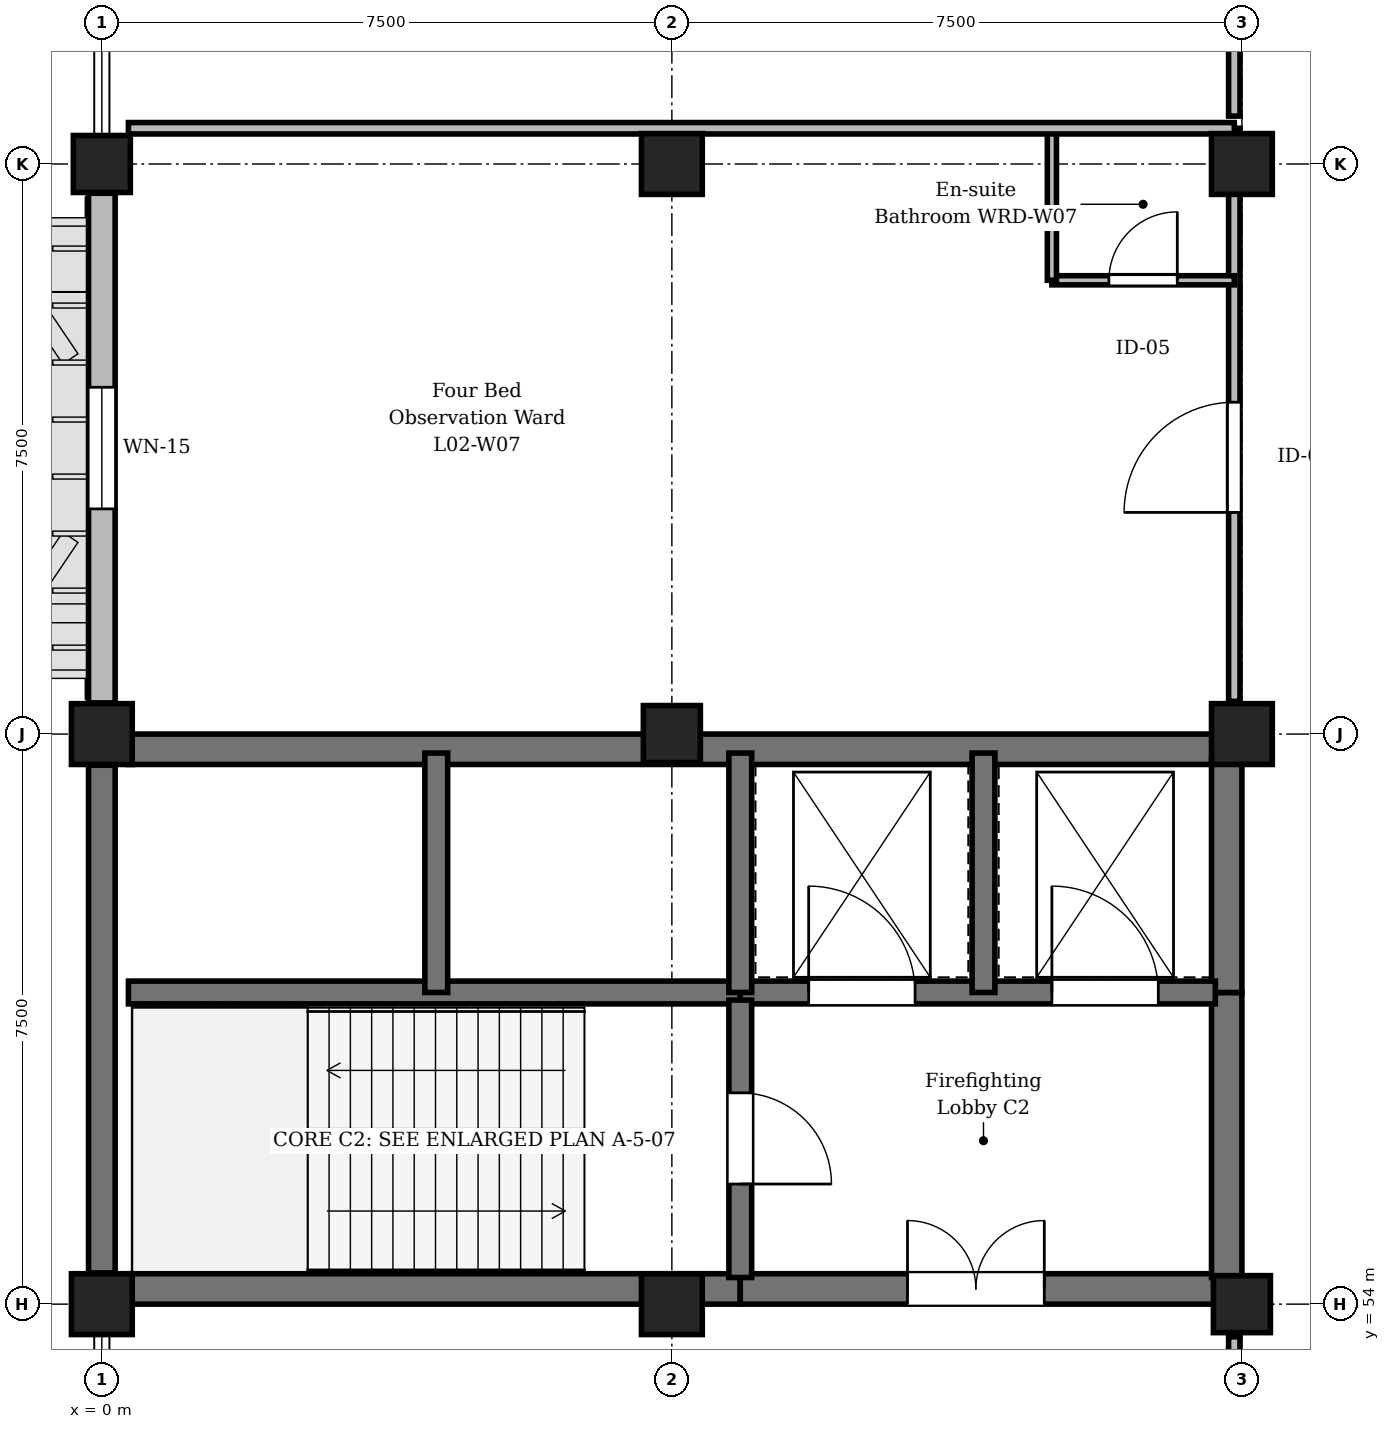
"""IFC4 building model, lengths in metres.
Left out: names, types, materials, properties, quantities, classifications, styles, units other than length and angle.
Written with IfcOpenShell. Run it as: python <this file> out.ifc"""

import sys

from ifc_helpers import new_model, si_unit, direction, frame, frame_2d, origin, origin_2d, place, context, subcontext, project, spatial, rectangle, circle, extrude, element, fill, save


model = new_model("IFC4")
c1 = context("Model", 3, precision=1e-05, world=origin(), true_north=direction((0.0, 1.0)))
c2 = subcontext(c1, "Body", "Model", "MODEL_VIEW")
j1 = project(units=[si_unit("LENGTHUNIT", "METRE"), si_unit("PLANEANGLEUNIT", "RADIAN")], contexts=[c1])
p1 = place(None, origin())
s1 = spatial("IfcSite", under=j1, at=p1, CompositionType="ELEMENT")
p2 = place(p1, origin())
s2 = spatial("IfcBuilding", under=s1, at=p2, CompositionType="ELEMENT")
p3 = place(p2, frame((0.0, 0.0, 9.3)))
s3 = spatial("IfcBuildingStorey", under=s2, at=p3, CompositionType="ELEMENT", Elevation=9.3)
for number, where, z_axis, x_axis in (
    (1, (0.0, 54.0, 0.0), (0.0, 0.0, 1.0), (1.0, 0.0, 0.0)),
    (2, (0.0, 61.5, 0.0), (0.0, 0.0, 1.0), (1.0, 0.0, 0.0)),
):
    element("IfcColumn", number, at=place(p3, frame(where, z_axis=z_axis, x_axis=x_axis)), inside=s3, PredefinedType="COLUMN", context=c2, shape_type="SweptSolid", body=[
        extrude(rectangle(XDim=0.8, YDim=0.8, at=origin_2d()), origin(), (0.0, 0.0, 1.0), 4.8),
    ])
p4 = place(p3, frame((0.0, 69.0, 0.0), z_axis=(0.0, 0.0, 1.0), x_axis=(1.0, 0.0, 0.0)))
e3 = element("IfcColumn", 3, at=p4, inside=s3, PredefinedType="COLUMN", context=c2, shape_type="SweptSolid", body=[
    extrude(circle(Radius=0.375, at=origin_2d()), origin(), (0.0, 0.0, 1.0), 4.8),
])
p5 = place(p3, frame((7.5, 54.0, 0.0), z_axis=(0.0, 0.0, 1.0), x_axis=(1.0, 0.0, 0.0)))
e4 = element("IfcColumn", 4, at=p5, inside=s3, PredefinedType="COLUMN", context=c2, shape_type="SweptSolid", body=[
    extrude(rectangle(XDim=0.8, YDim=0.8, at=origin_2d()), origin(), (0.0, 0.0, 1.0), 4.8),
])
p6 = place(p3, frame((7.5, 61.5, 0.0), z_axis=(0.0, 0.0, 1.0), x_axis=(1.0, 0.0, 0.0)))
e5 = element("IfcColumn", 5, at=p6, inside=s3, PredefinedType="COLUMN", context=c2, shape_type="SweptSolid", body=[
    extrude(circle(Radius=0.375, at=origin_2d()), origin(), (0.0, 0.0, 1.0), 4.8),
])
p7 = place(p3, frame((7.5, 69.0, 0.0), z_axis=(0.0, 0.0, 1.0), x_axis=(1.0, 0.0, 0.0)))
e6 = element("IfcColumn", 6, at=p7, inside=s3, PredefinedType="COLUMN", context=c2, shape_type="SweptSolid", body=[
    extrude(rectangle(XDim=0.8, YDim=0.8, at=origin_2d()), origin(), (0.0, 0.0, 1.0), 4.8),
])
p8 = place(p3, frame((15.0, 54.0, 0.0), z_axis=(0.0, 0.0, 1.0), x_axis=(1.0, 0.0, 0.0)))
e7 = element("IfcColumn", 7, at=p8, inside=s3, PredefinedType="COLUMN", context=c2, shape_type="SweptSolid", body=[
    extrude(circle(Radius=0.375, at=origin_2d()), origin(), (0.0, 0.0, 1.0), 4.8),
])
for number, where, z_axis, x_axis in (
    (8, (15.0, 61.5, 0.0), (0.0, 0.0, 1.0), (1.0, 0.0, 0.0)),
    (9, (15.0, 69.0, 0.0), (0.0, 0.0, 1.0), (1.0, 0.0, 0.0)),
):
    element("IfcColumn", number, at=place(p3, frame(where, z_axis=z_axis, x_axis=x_axis)), inside=s3, PredefinedType="COLUMN", context=c2, shape_type="SweptSolid", body=[
        extrude(rectangle(XDim=0.8, YDim=0.8, at=origin_2d()), origin(), (0.0, 0.0, 1.0), 4.8),
    ])
p9 = place(p3, frame((0.0, 54.41, 0.0), z_axis=(0.0, 0.0, 1.0), x_axis=(0.0, 1.0, 0.0)))
e10 = element("IfcWall", 10, at=p9, inside=s3, PredefinedType="SHEAR", context=c2, shape_type="SweptSolid", body=[
    extrude(rectangle(XDim=6.68, YDim=0.35, at=frame_2d((3.34, 0.0))), origin(), (0.0, 0.0, 1.0), 4.55),
])
p10 = place(p3, frame((0.0, 61.91, 0.0), z_axis=(0.0, 0.0, 1.0), x_axis=(0.0, 1.0, 0.0)))
e11 = element("IfcWall", 11, at=p10, inside=s3, PredefinedType="STANDARD", context=c2, shape_type="SweptSolid", body=[
    extrude(rectangle(XDim=6.705, YDim=0.35, at=frame_2d((3.353, 0.0))), origin(), (0.0, 0.0, 1.0), 3.95),
])
p11 = place(p10, frame((2.552, 0.0, 0.9)))
e12 = element("IfcOpeningElement", 12, at=p11, cuts=e11, PredefinedType="OPENING", context=c2, shape_type="SweptSolid", body=[
    extrude(rectangle(XDim=1.6, YDim=1.8, at=frame_2d((0.8, 0.9))), frame((0.0, 0.185, 0.0), z_axis=(0.0, -1.0, 0.0), x_axis=(1.0, 0.0, 0.0)), (0.0, 0.0, 1.0), 0.37),
])
p12 = place(p3, frame((0.35, 54.2, 0.0), z_axis=(0.0, 0.0, 1.0), x_axis=(1.0, 0.0, 0.0)))
e13 = element("IfcWall", 13, at=p12, inside=s3, PredefinedType="SHEAR", context=c2, shape_type="SweptSolid", body=[
    extrude(rectangle(XDim=8.05, YDim=0.4, at=frame_2d((4.025, 0.0))), origin(), (0.0, 0.0, 1.0), 4.55),
])
p13 = place(p3, frame((8.4, 54.2, 0.0), z_axis=(0.0, 0.0, 1.0), x_axis=(1.0, 0.0, 0.0)))
e14 = element("IfcWall", 14, at=p13, inside=s3, PredefinedType="SHEAR", context=c2, shape_type="SweptSolid", body=[
    extrude(rectangle(XDim=6.25, YDim=0.4, at=frame_2d((3.125, 0.0))), origin(), (0.0, 0.0, 1.0), 4.55),
])
p14 = place(p13, frame((2.2, 0.0, 0.0)))
e15 = element("IfcOpeningElement", 15, at=p14, cuts=e14, PredefinedType="OPENING", context=c2, shape_type="SweptSolid", body=[
    extrude(rectangle(XDim=1.8, YDim=2.25, at=frame_2d((0.9, 1.125))), frame((0.0, 0.21, 0.0), z_axis=(0.0, -1.0, 0.0), x_axis=(1.0, 0.0, 0.0)), (0.0, 0.0, 1.0), 0.42),
])
p15 = place(p3, frame((0.35, 61.3, 0.0), z_axis=(0.0, 0.0, 1.0), x_axis=(1.0, 0.0, 0.0)))
e16 = element("IfcWall", 16, at=p15, inside=s3, PredefinedType="SHEAR", context=c2, shape_type="SweptSolid", body=[
    extrude(rectangle(XDim=14.3, YDim=0.4, at=frame_2d((7.15, 0.0))), origin(), (0.0, 0.0, 1.0), 4.55),
])
p16 = place(p3, frame((14.8, 54.35, 0.0), z_axis=(0.0, 0.0, 1.0), x_axis=(0.0, 1.0, 0.0)))
e17 = element("IfcWall", 17, at=p16, inside=s3, PredefinedType="SHEAR", context=c2, shape_type="SweptSolid", body=[
    extrude(rectangle(XDim=3.75, YDim=0.4, at=frame_2d((1.875, 0.0))), origin(), (0.0, 0.0, 1.0), 4.55),
])
p17 = place(p3, frame((14.8, 58.1, 0.0), z_axis=(0.0, 0.0, 1.0), x_axis=(0.0, 1.0, 0.0)))
e18 = element("IfcWall", 18, at=p17, inside=s3, PredefinedType="SHEAR", context=c2, shape_type="SweptSolid", body=[
    extrude(rectangle(XDim=3.05, YDim=0.4, at=frame_2d((1.525, 0.0))), origin(), (0.0, 0.0, 1.0), 4.55),
])
p18 = place(p3, frame((0.35, 58.1, 0.0), z_axis=(0.0, 0.0, 1.0), x_axis=(1.0, 0.0, 0.0)))
e19 = element("IfcWall", 19, at=p18, inside=s3, PredefinedType="SHEAR", context=c2, shape_type="SweptSolid", body=[
    extrude(rectangle(XDim=8.05, YDim=0.3, at=frame_2d((4.025, 0.0))), origin(), (0.0, 0.0, 1.0), 4.55),
])
p19 = place(p3, frame((8.4, 58.1, 0.0), z_axis=(0.0, 0.0, 1.0), x_axis=(1.0, 0.0, 0.0)))
e20 = element("IfcWall", 20, at=p19, inside=s3, PredefinedType="SHEAR", context=c2, shape_type="SweptSolid", body=[
    extrude(rectangle(XDim=6.25, YDim=0.3, at=frame_2d((3.125, 0.0))), origin(), (0.0, 0.0, 1.0), 4.55),
])
p20 = place(p19, frame((0.9, 0.0, 0.0)))
e21 = element("IfcOpeningElement", 21, at=p20, cuts=e20, PredefinedType="OPENING", context=c2, shape_type="SweptSolid", body=[
    extrude(rectangle(XDim=1.4, YDim=2.25, at=frame_2d((0.7, 1.125))), frame((0.0, 0.16, 0.0), z_axis=(0.0, -1.0, 0.0), x_axis=(1.0, 0.0, 0.0)), (0.0, 0.0, 1.0), 0.32),
])
p21 = place(p19, frame((4.1, 0.0, 0.0)))
e22 = element("IfcOpeningElement", 22, at=p21, cuts=e20, PredefinedType="OPENING", context=c2, shape_type="SweptSolid", body=[
    extrude(rectangle(XDim=1.4, YDim=2.25, at=frame_2d((0.7, 1.125))), frame((0.0, 0.16, 0.0), z_axis=(0.0, -1.0, 0.0), x_axis=(1.0, 0.0, 0.0)), (0.0, 0.0, 1.0), 0.32),
])
p22 = place(p3, frame((8.4, 58.0, 0.0), z_axis=(0.0, 0.0, 1.0), x_axis=(0.0, -1.0, 0.0)))
e23 = element("IfcWall", 23, at=p22, inside=s3, PredefinedType="SHEAR", context=c2, shape_type="SweptSolid", body=[
    extrude(rectangle(XDim=3.65, YDim=0.3, at=frame_2d((1.825, 0.0))), origin(), (0.0, 0.0, 1.0), 4.55),
])
p23 = place(p22, frame((1.22, 0.0, 0.0)))
e24 = element("IfcOpeningElement", 24, at=p23, cuts=e23, PredefinedType="OPENING", context=c2, shape_type="SweptSolid", body=[
    extrude(rectangle(XDim=1.2, YDim=2.25, at=frame_2d((0.6, 1.125))), frame((0.0, 0.16, 0.0), z_axis=(0.0, -1.0, 0.0), x_axis=(1.0, 0.0, 0.0)), (0.0, 0.0, 1.0), 0.32),
])
for number, where, z_axis, x_axis in (
    (25, (4.4, 58.1, 0.0), (0.0, 0.0, 1.0), (0.0, 1.0, 0.0)),
    (26, (8.4, 58.1, 0.0), (0.0, 0.0, 1.0), (0.0, 1.0, 0.0)),
    (27, (11.6, 58.1, 0.0), (0.0, 0.0, 1.0), (0.0, 1.0, 0.0)),
):
    element("IfcWall", number, at=place(p3, frame(where, z_axis=z_axis, x_axis=x_axis)), inside=s3, PredefinedType="SHEAR", context=c2, shape_type="SweptSolid", body=[
        extrude(rectangle(XDim=3.15, YDim=0.3, at=frame_2d((1.575, 0.0))), origin(), (0.0, 0.0, 1.0), 4.55),
    ])
p24 = place(p3, frame((14.9, 46.07, 0.0), z_axis=(0.0, 0.0, 1.0), x_axis=(0.0, 1.0, 0.0)))
e28 = element("IfcWall", 28, at=p24, inside=s3, PredefinedType="PARTITIONING", context=c2, shape_type="SweptSolid", body=[
    extrude(rectangle(XDim=7.5, YDim=0.15, at=frame_2d((3.75, 0.0))), origin(), (0.0, 0.0, 1.0), 3.985),
])
p25 = place(p24, frame((3.58, 0.0, 0.0)))
e29 = element("IfcOpeningElement", 29, at=p25, cuts=e28, PredefinedType="OPENING", context=c2, shape_type="SweptSolid", body=[
    extrude(rectangle(XDim=1.45, YDim=2.3, at=frame_2d((0.725, 1.15))), frame((0.0, 0.085, 0.0), z_axis=(0.0, -1.0, 0.0), x_axis=(1.0, 0.0, 0.0)), (0.0, 0.0, 1.0), 0.17),
])
p26 = place(p3, frame((14.9, 61.93, 0.0), z_axis=(0.0, 0.0, 1.0), x_axis=(0.0, 1.0, 0.0)))
e30 = element("IfcWall", 30, at=p26, inside=s3, PredefinedType="PARTITIONING", context=c2, shape_type="SweptSolid", body=[
    extrude(rectangle(XDim=7.54, YDim=0.15, at=frame_2d((3.77, 0.0))), origin(), (0.0, 0.0, 1.0), 3.985),
])
p27 = place(p26, frame((2.486, 0.0, 0.0)))
e31 = element("IfcOpeningElement", 31, at=p27, cuts=e30, PredefinedType="OPENING", context=c2, shape_type="SweptSolid", body=[
    extrude(rectangle(XDim=1.45, YDim=2.3, at=frame_2d((0.725, 1.15))), frame((0.0, 0.085, 0.0), z_axis=(0.0, -1.0, 0.0), x_axis=(1.0, 0.0, 0.0)), (0.0, 0.0, 1.0), 0.17),
])
p28 = place(p3, frame((12.5, 67.47, 0.0), z_axis=(0.0, 0.0, 1.0), x_axis=(1.0, 0.0, 0.0)))
e32 = element("IfcWall", 32, at=p28, inside=s3, PredefinedType="PARTITIONING", context=c2, shape_type="SweptSolid", body=[
    extrude(rectangle(XDim=2.4, YDim=0.12, at=frame_2d((1.2, 0.0))), origin(), (0.0, 0.0, 1.0), 4.535),
])
p29 = place(p28, frame((0.75, 0.0, 0.0)))
e33 = element("IfcOpeningElement", 33, at=p29, cuts=e32, PredefinedType="OPENING", context=c2, shape_type="SweptSolid", body=[
    extrude(rectangle(XDim=0.9, YDim=2.1, at=frame_2d((0.45, 1.05))), frame((0.0, 0.07, 0.0), z_axis=(0.0, -1.0, 0.0), x_axis=(1.0, 0.0, 0.0)), (0.0, 0.0, 1.0), 0.14),
])
p30 = place(p3, frame((12.5, 67.47, 0.0), z_axis=(0.0, 0.0, 1.0), x_axis=(0.0, 1.0, 0.0)))
e34 = element("IfcWall", 34, at=p30, inside=s3, PredefinedType="PARTITIONING", context=c2, shape_type="SweptSolid", body=[
    extrude(rectangle(XDim=2.0, YDim=0.12, at=frame_2d((1.0, 0.0))), origin(), (0.0, 0.0, 1.0), 4.535),
])
p31 = place(p3, frame((14.9, 69.63, 0.0), z_axis=(0.0, 0.0, 1.0), x_axis=(0.0, 1.0, 0.0)))
e35 = element("IfcWall", 35, at=p31, inside=s3, PredefinedType="PARTITIONING", context=c2, shape_type="SweptSolid", body=[
    extrude(rectangle(XDim=7.54, YDim=0.15, at=frame_2d((3.77, 0.0))), origin(), (0.0, 0.0, 1.0), 3.835),
])
p32 = place(p31, frame((2.526, 0.0, 0.0)))
e36 = element("IfcOpeningElement", 36, at=p32, cuts=e35, PredefinedType="OPENING", context=c2, shape_type="SweptSolid", body=[
    extrude(rectangle(XDim=1.35, YDim=2.25, at=frame_2d((0.675, 1.125))), frame((0.0, 0.085, 0.0), z_axis=(0.0, -1.0, 0.0), x_axis=(1.0, 0.0, 0.0)), (0.0, 0.0, 1.0), 0.17),
])
p33 = place(p3, frame((0.35, 69.47, 0.0), z_axis=(0.0, 0.0, 1.0), x_axis=(1.0, 0.0, 0.0)))
e37 = element("IfcWall", 37, at=p33, inside=s3, PredefinedType="PARTITIONING", context=c2, shape_type="SweptSolid", body=[
    extrude(rectangle(XDim=14.55, YDim=0.15, at=frame_2d((7.275, 0.0))), origin(), (0.0, 0.0, 1.0), 4.535),
])
p34 = place(p11, origin())
e38 = element("IfcWindow", 38, at=p34, inside=s3, PartitioningType="SINGLE_PANEL", PredefinedType="WINDOW", context=c2, shape_type="SweptSolid", body=[
    extrude(rectangle(XDim=1.6, YDim=1.8, at=frame_2d((0.8, 0.9))), frame((0.0, 0.03, 0.0), z_axis=(0.0, -1.0, 0.0), x_axis=(1.0, 0.0, 0.0)), (0.0, 0.0, 1.0), 0.06),
])
fill(e12, e38)
p35 = place(p14, origin())
e39 = element("IfcDoor", 39, at=p35, inside=s3, OperationType="DOUBLE_DOOR_SINGLE_SWING", PredefinedType="DOOR", context=c2, shape_type="SweptSolid", body=[
    extrude(rectangle(XDim=1.8, YDim=2.25, at=frame_2d((0.9, 1.125))), frame((0.0, 0.025, 0.0), z_axis=(0.0, -1.0, 0.0), x_axis=(1.0, 0.0, 0.0)), (0.0, 0.0, 1.0), 0.05),
])
fill(e15, e39)
p36 = place(p20, origin())
e40 = element("IfcDoor", 40, at=p36, inside=s3, OperationType="DOUBLE_DOOR_SLIDING", PredefinedType="DOOR", context=c2, shape_type="SweptSolid", body=[
    extrude(rectangle(XDim=1.4, YDim=2.25, at=frame_2d((0.7, 1.125))), frame((0.0, 0.025, 0.0), z_axis=(0.0, -1.0, 0.0), x_axis=(1.0, 0.0, 0.0)), (0.0, 0.0, 1.0), 0.05),
])
fill(e21, e40)
p37 = place(p21, origin())
e41 = element("IfcDoor", 41, at=p37, inside=s3, OperationType="DOUBLE_DOOR_SLIDING", PredefinedType="DOOR", context=c2, shape_type="SweptSolid", body=[
    extrude(rectangle(XDim=1.4, YDim=2.25, at=frame_2d((0.7, 1.125))), frame((0.0, 0.025, 0.0), z_axis=(0.0, -1.0, 0.0), x_axis=(1.0, 0.0, 0.0)), (0.0, 0.0, 1.0), 0.05),
])
fill(e22, e41)
p38 = place(p23, origin())
e42 = element("IfcDoor", 42, at=p38, inside=s3, OperationType="SINGLE_SWING_RIGHT", PredefinedType="DOOR", context=c2, shape_type="SweptSolid", body=[
    extrude(rectangle(XDim=1.2, YDim=2.25, at=frame_2d((0.6, 1.125))), frame((0.0, 0.025, 0.0), z_axis=(0.0, -1.0, 0.0), x_axis=(1.0, 0.0, 0.0)), (0.0, 0.0, 1.0), 0.05),
])
fill(e24, e42)
p39 = place(p27, origin())
e43 = element("IfcDoor", 43, at=p39, inside=s3, OperationType="SINGLE_SWING_LEFT", PredefinedType="DOOR", context=c2, shape_type="SweptSolid", body=[
    extrude(rectangle(XDim=1.45, YDim=2.3, at=frame_2d((0.725, 1.15))), frame((0.0, 0.025, 0.0), z_axis=(0.0, -1.0, 0.0), x_axis=(1.0, 0.0, 0.0)), (0.0, 0.0, 1.0), 0.05),
])
fill(e31, e43)
p40 = place(p29, origin())
e44 = element("IfcDoor", 44, at=p40, inside=s3, OperationType="SINGLE_SWING_RIGHT", PredefinedType="DOOR", context=c2, shape_type="SweptSolid", body=[
    extrude(rectangle(XDim=0.9, YDim=2.1, at=frame_2d((0.45, 1.05))), frame((0.0, 0.025, 0.0), z_axis=(0.0, -1.0, 0.0), x_axis=(1.0, 0.0, 0.0)), (0.0, 0.0, 1.0), 0.05),
])
fill(e33, e44)
save(model, sys.argv[1])
